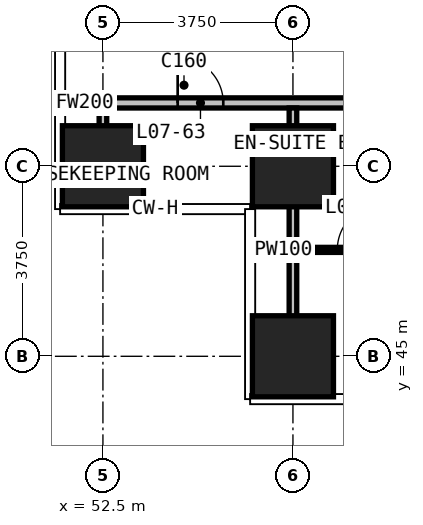
"""IFC4 building model, lengths in metres.
Left out: names, types, materials, properties, quantities, classifications, styles, units other than length and angle.
Written with IfcOpenShell. Run it as: python <this file> out.ifc"""

import sys

from ifc_helpers import new_model, si_unit, direction, frame, frame_2d, origin, origin_2d, place, context, subcontext, project, spatial, rectangle, extrude, element, fill, save


model = new_model("IFC4")
c1 = context("Model", 3, precision=1e-05, world=origin(), true_north=direction((0.0, 1.0)))
c2 = subcontext(c1, "Body", "Model", "MODEL_VIEW")
j1 = project(units=[si_unit("LENGTHUNIT", "METRE"), si_unit("PLANEANGLEUNIT", "RADIAN")], contexts=[c1])
p1 = place(None, origin())
s1 = spatial("IfcSite", under=j1, at=p1, CompositionType="ELEMENT")
p2 = place(p1, origin())
s2 = spatial("IfcBuilding", under=s1, at=p2, CompositionType="ELEMENT")
p3 = place(p2, frame((0.0, 0.0, 42.8)))
s3 = spatial("IfcBuildingStorey", under=s2, at=p3, CompositionType="ELEMENT", Elevation=42.8)
for number, where, z_axis, x_axis in (
    (1, (52.5, 48.75, 0.0), (0.0, 0.0, 1.0), (1.0, 0.0, 0.0)),
    (2, (56.25, 45.0, 0.0), (0.0, 0.0, 1.0), (1.0, 0.0, 0.0)),
    (3, (56.25, 48.75, 0.0), (0.0, 0.0, 1.0), (1.0, 0.0, 0.0)),
):
    element("IfcColumn", number, at=place(p3, frame(where, z_axis=z_axis, x_axis=x_axis)), inside=s3, PredefinedType="COLUMN", context=c2, shape_type="SweptSolid", body=[
        extrude(rectangle(XDim=1.6, YDim=1.6, at=origin_2d()), origin(), (0.0, 0.0, 1.0), 3.3),
    ])
p4 = place(p3, frame((51.855, 50.0, 0.0), z_axis=(0.0, 0.0, 1.0), x_axis=(1.0, 0.0, 0.0)))
e4 = element("IfcWall", 4, at=p4, inside=s3, PredefinedType="PARTITIONING", context=c2, shape_type="SweptSolid", body=[
    extrude(rectangle(XDim=0.57, YDim=0.2, at=frame_2d((0.285, 0.0))), origin(), (0.0, 0.0, 1.0), 3.0),
])
p5 = place(p3, frame((52.575, 50.0, 0.0), z_axis=(0.0, 0.0, 1.0), x_axis=(1.0, 0.0, 0.0)))
e5 = element("IfcWall", 5, at=p5, inside=s3, PredefinedType="PARTITIONING", context=c2, shape_type="SweptSolid", body=[
    extrude(rectangle(XDim=44.85, YDim=0.2, at=frame_2d((22.425, 0.0))), origin(), (0.0, 0.0, 1.0), 3.0),
])
p6 = place(p5, frame((5.925, 0.0, 0.0)))
e6 = element("IfcOpeningElement", 6, at=p6, cuts=e5, PredefinedType="OPENING", context=c2, shape_type="SweptSolid", body=[
    extrude(rectangle(XDim=1.0, YDim=2.2, at=frame_2d((0.5, 1.1))), frame((0.0, 0.11, 0.0), z_axis=(0.0, -1.0, 0.0), x_axis=(1.0, 0.0, 0.0)), (0.0, 0.0, 1.0), 0.22),
])
p7 = place(p5, frame((7.925, 0.0, 0.0)))
e7 = element("IfcOpeningElement", 7, at=p7, cuts=e5, PredefinedType="OPENING", context=c2, shape_type="SweptSolid", body=[
    extrude(rectangle(XDim=1.0, YDim=2.2, at=frame_2d((0.5, 1.1))), frame((0.0, 0.11, 0.0), z_axis=(0.0, -1.0, 0.0), x_axis=(1.0, 0.0, 0.0)), (0.0, 0.0, 1.0), 0.22),
])
p8 = place(p5, frame((13.425, 0.0, 0.0)))
e8 = element("IfcOpeningElement", 8, at=p8, cuts=e5, PredefinedType="OPENING", context=c2, shape_type="SweptSolid", body=[
    extrude(rectangle(XDim=1.0, YDim=2.2, at=frame_2d((0.5, 1.1))), frame((0.0, 0.11, 0.0), z_axis=(0.0, -1.0, 0.0), x_axis=(1.0, 0.0, 0.0)), (0.0, 0.0, 1.0), 0.22),
])
p9 = place(p5, frame((15.425, 0.0, 0.0)))
e9 = element("IfcOpeningElement", 9, at=p9, cuts=e5, PredefinedType="OPENING", context=c2, shape_type="SweptSolid", body=[
    extrude(rectangle(XDim=1.0, YDim=2.2, at=frame_2d((0.5, 1.1))), frame((0.0, 0.11, 0.0), z_axis=(0.0, -1.0, 0.0), x_axis=(1.0, 0.0, 0.0)), (0.0, 0.0, 1.0), 0.22),
])
p10 = place(p5, frame((20.925, 0.0, 0.0)))
e10 = element("IfcOpeningElement", 10, at=p10, cuts=e5, PredefinedType="OPENING", context=c2, shape_type="SweptSolid", body=[
    extrude(rectangle(XDim=1.0, YDim=2.2, at=frame_2d((0.5, 1.1))), frame((0.0, 0.11, 0.0), z_axis=(0.0, -1.0, 0.0), x_axis=(1.0, 0.0, 0.0)), (0.0, 0.0, 1.0), 0.22),
])
p11 = place(p5, frame((22.925, 0.0, 0.0)))
e11 = element("IfcOpeningElement", 11, at=p11, cuts=e5, PredefinedType="OPENING", context=c2, shape_type="SweptSolid", body=[
    extrude(rectangle(XDim=1.0, YDim=2.2, at=frame_2d((0.5, 1.1))), frame((0.0, 0.11, 0.0), z_axis=(0.0, -1.0, 0.0), x_axis=(1.0, 0.0, 0.0)), (0.0, 0.0, 1.0), 0.22),
])
p12 = place(p5, frame((28.425, 0.0, 0.0)))
e12 = element("IfcOpeningElement", 12, at=p12, cuts=e5, PredefinedType="OPENING", context=c2, shape_type="SweptSolid", body=[
    extrude(rectangle(XDim=1.0, YDim=2.2, at=frame_2d((0.5, 1.1))), frame((0.0, 0.11, 0.0), z_axis=(0.0, -1.0, 0.0), x_axis=(1.0, 0.0, 0.0)), (0.0, 0.0, 1.0), 0.22),
])
p13 = place(p5, frame((30.425, 0.0, 0.0)))
e13 = element("IfcOpeningElement", 13, at=p13, cuts=e5, PredefinedType="OPENING", context=c2, shape_type="SweptSolid", body=[
    extrude(rectangle(XDim=1.0, YDim=2.2, at=frame_2d((0.5, 1.1))), frame((0.0, 0.11, 0.0), z_axis=(0.0, -1.0, 0.0), x_axis=(1.0, 0.0, 0.0)), (0.0, 0.0, 1.0), 0.22),
])
p14 = place(p5, frame((35.925, 0.0, 0.0)))
e14 = element("IfcOpeningElement", 14, at=p14, cuts=e5, PredefinedType="OPENING", context=c2, shape_type="SweptSolid", body=[
    extrude(rectangle(XDim=1.0, YDim=2.2, at=frame_2d((0.5, 1.1))), frame((0.0, 0.11, 0.0), z_axis=(0.0, -1.0, 0.0), x_axis=(1.0, 0.0, 0.0)), (0.0, 0.0, 1.0), 0.22),
])
p15 = place(p5, frame((37.925, 0.0, 0.0)))
e15 = element("IfcOpeningElement", 15, at=p15, cuts=e5, PredefinedType="OPENING", context=c2, shape_type="SweptSolid", body=[
    extrude(rectangle(XDim=1.0, YDim=2.2, at=frame_2d((0.5, 1.1))), frame((0.0, 0.11, 0.0), z_axis=(0.0, -1.0, 0.0), x_axis=(1.0, 0.0, 0.0)), (0.0, 0.0, 1.0), 0.22),
])
p16 = place(p5, frame((1.4, 0.0, 0.0)))
e16 = element("IfcOpeningElement", 16, at=p16, cuts=e5, PredefinedType="OPENING", context=c2, shape_type="SweptSolid", body=[
    extrude(rectangle(XDim=0.9, YDim=2.2, at=frame_2d((0.45, 1.1))), frame((0.0, 0.11, 0.0), z_axis=(0.0, -1.0, 0.0), x_axis=(1.0, 0.0, 0.0)), (0.0, 0.0, 1.0), 0.22),
])
p17 = place(p5, frame((42.575, 0.0, 0.0)))
e17 = element("IfcOpeningElement", 17, at=p17, cuts=e5, PredefinedType="OPENING", context=c2, shape_type="SweptSolid", body=[
    extrude(rectangle(XDim=0.9, YDim=2.2, at=frame_2d((0.45, 1.1))), frame((0.0, 0.11, 0.0), z_axis=(0.0, -1.0, 0.0), x_axis=(1.0, 0.0, 0.0)), (0.0, 0.0, 1.0), 0.22),
])
p18 = place(p3, frame((52.5, 48.105, 0.0), z_axis=(0.0, 0.0, 1.0), x_axis=(0.0, 1.0, 0.0)))
e18 = element("IfcWall", 18, at=p18, inside=s3, PredefinedType="PARTITIONING", context=c2, shape_type="SweptSolid", body=[
    extrude(rectangle(XDim=1.995, YDim=0.15, at=frame_2d((0.998, 0.0))), origin(), (0.0, 0.0, 1.0), 3.0),
])
p19 = place(p3, frame((56.25, 44.235, 0.0), z_axis=(0.0, 0.0, 1.0), x_axis=(0.0, 1.0, 0.0)))
e19 = element("IfcWall", 19, at=p19, inside=s3, PredefinedType="PARTITIONING", context=c2, shape_type="SweptSolid", body=[
    extrude(rectangle(XDim=5.665, YDim=0.15, at=frame_2d((2.833, 0.0))), origin(), (0.0, 0.0, 1.0), 3.0),
])
p20 = place(p3, frame((56.325, 47.1, 0.0), z_axis=(0.0, 0.0, 1.0), x_axis=(1.0, 0.0, 0.0)))
e20 = element("IfcWall", 20, at=p20, inside=s3, PredefinedType="PARTITIONING", context=c2, shape_type="SweptSolid", body=[
    extrude(rectangle(XDim=1.875, YDim=0.1, at=frame_2d((0.938, 0.0))), origin(), (0.0, 0.0, 1.0), 3.0),
])
p21 = place(p20, frame((0.8, 0.0, 0.0)))
e21 = element("IfcOpeningElement", 21, at=p21, cuts=e20, PredefinedType="OPENING", context=c2, shape_type="SweptSolid", body=[
    extrude(rectangle(XDim=0.9, YDim=2.2, at=frame_2d((0.45, 1.1))), frame((0.0, 0.06, 0.0), z_axis=(0.0, -1.0, 0.0), x_axis=(1.0, 0.0, 0.0)), (0.0, 0.0, 1.0), 0.12),
])
p22 = place(p21, origin())
e22 = element("IfcDoor", 22, at=p22, inside=s3, OperationType="SINGLE_SWING_RIGHT", PredefinedType="DOOR", context=c2, shape_type="SweptSolid", body=[
    extrude(rectangle(XDim=0.9, YDim=2.2, at=frame_2d((0.45, 1.1))), frame((0.0, 0.025, 0.0), z_axis=(0.0, -1.0, 0.0), x_axis=(1.0, 0.0, 0.0)), (0.0, 0.0, 1.0), 0.05),
])
fill(e21, e22)
p23 = place(p16, origin())
e23 = element("IfcDoor", 23, at=p23, inside=s3, OperationType="SINGLE_SWING_RIGHT", PredefinedType="DOOR", context=c2, shape_type="SweptSolid", body=[
    extrude(rectangle(XDim=0.9, YDim=2.2, at=frame_2d((0.45, 1.1))), frame((0.0, 0.025, 0.0), z_axis=(0.0, -1.0, 0.0), x_axis=(1.0, 0.0, 0.0)), (0.0, 0.0, 1.0), 0.05),
])
fill(e16, e23)
save(model, sys.argv[1])
